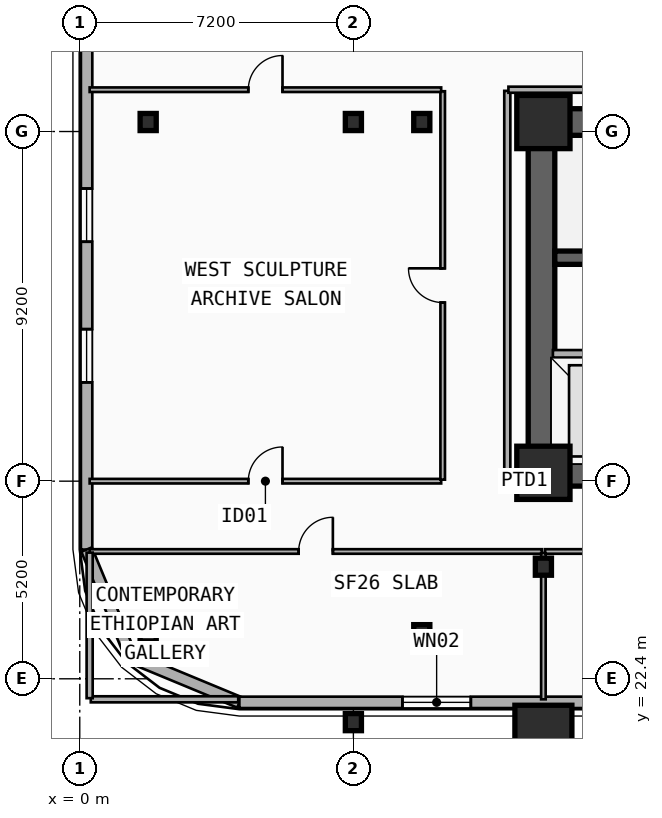
"""IFC4 building model, lengths in metres.
Left out: names, types, materials, properties, quantities, classifications, styles, units other than length and angle.
Written with IfcOpenShell. Run it as: python <this file> out.ifc"""

import sys

from ifc_helpers import new_model, si_unit, direction, frame, frame_2d, origin, origin_2d, place, context, subcontext, project, spatial, rectangle, i_section, extrude, element, fill, save


model = new_model("IFC4")
c1 = context("Model", 3, precision=1e-05, world=origin(), true_north=direction((0.0, 1.0)))
c2 = subcontext(c1, "Body", "Model", "MODEL_VIEW")
j1 = project(units=[si_unit("LENGTHUNIT", "METRE"), si_unit("PLANEANGLEUNIT", "RADIAN")], contexts=[c1])
p1 = place(None, origin())
s1 = spatial("IfcSite", under=j1, at=p1, CompositionType="ELEMENT")
p2 = place(p1, origin())
s2 = spatial("IfcBuilding", under=s1, at=p2, CompositionType="ELEMENT")
p3 = place(p2, frame((0.0, 0.0, 57.0)))
s3 = spatial("IfcBuildingStorey", under=s2, at=p3, CompositionType="ELEMENT", Elevation=57.0)
p4 = place(p3, frame((12.15, 37.05, 0.0), z_axis=(0.0, 0.0, 1.0), x_axis=(1.0, 0.0, 0.0)))
e1 = element("IfcWall", 1, at=p4, inside=s3, PredefinedType="SHEAR", context=c2, shape_type="SweptSolid", body=[
    extrude(rectangle(XDim=33.23, YDim=0.7, at=frame_2d((16.615, 0.0))), origin(), (0.0, 0.0, 1.0), 3.5),
])
p5 = place(p3, frame((21.18, 27.82, 0.0), z_axis=(0.0, 0.0, 1.0), x_axis=(-1.0, 0.0, 0.0)))
e2 = element("IfcWall", 2, at=p5, inside=s3, PredefinedType="SHEAR", context=c2, shape_type="SweptSolid", body=[
    extrude(rectangle(XDim=9.03, YDim=0.7, at=frame_2d((4.515, 0.0))), origin(), (0.0, 0.0, 1.0), 3.5),
])
p6 = place(p5, frame((2.68, 0.0, 0.0)))
e3 = element("IfcOpeningElement", 3, at=p6, cuts=e2, PredefinedType="OPENING", context=c2, shape_type="SweptSolid", body=[
    extrude(rectangle(XDim=1.1, YDim=2.15, at=frame_2d((0.55, 1.075))), frame((0.0, 0.36, 0.0), z_axis=(0.0, -1.0, 0.0), x_axis=(1.0, 0.0, 0.0)), (0.0, 0.0, 1.0), 0.72),
])
p7 = place(p3, frame((12.15, 28.17, 0.0), z_axis=(0.0, 0.0, 1.0), x_axis=(0.0, 1.0, 0.0)))
e4 = element("IfcWall", 4, at=p7, inside=s3, PredefinedType="SHEAR", context=c2, shape_type="SweptSolid", body=[
    extrude(rectangle(XDim=8.53, YDim=0.7, at=frame_2d((4.265, 0.0))), origin(), (0.0, 0.0, 1.0), 3.5),
])
p8 = place(p3, frame((21.005, 33.48, 0.0), z_axis=(0.0, 0.0, 1.0), x_axis=(-1.0, 0.0, 0.0)))
e5 = element("IfcWall", 5, at=p8, inside=s3, PredefinedType="SHEAR", context=c2, shape_type="SweptSolid", body=[
    extrude(rectangle(XDim=8.505, YDim=0.35, at=frame_2d((4.252, 0.0))), origin(), (0.0, 0.0, 1.0), 3.5),
])
p9 = place(p8, frame((0.22, 0.0, 0.0)))
e6 = element("IfcOpeningElement", 6, at=p9, cuts=e5, PredefinedType="OPENING", context=c2, shape_type="SweptSolid", body=[
    extrude(rectangle(XDim=1.1, YDim=2.15, at=frame_2d((0.55, 1.075))), frame((0.0, 0.185, 0.0), z_axis=(0.0, -1.0, 0.0), x_axis=(1.0, 0.0, 0.0)), (0.0, 0.0, 1.0), 0.37),
])
for number, where, z_axis, x_axis in (
    (7, (12.2, 27.82, 0.0), (0.0, 0.0, 1.0), (1.0, 0.0, 0.0)),
    (8, (12.2, 37.05, 0.0), (0.0, 0.0, 1.0), (1.0, 0.0, 0.0)),
):
    element("IfcColumn", number, at=place(p3, frame(where, z_axis=z_axis, x_axis=x_axis)), inside=s3, PredefinedType="COLUMN", context=c2, shape_type="SweptSolid", body=[
        extrude(rectangle(XDim=1.4, YDim=1.4, at=origin_2d()), origin(), (0.0, 0.0, 1.0), 3.5),
    ])
p10 = place(p3, frame((12.2, 25.35, 0.0), z_axis=(0.0, 0.0, 1.0), x_axis=(1.0, 0.0, 0.0)))
e9 = element("IfcColumn", 9, at=p10, inside=s3, PredefinedType="COLUMN", context=c2, shape_type="SweptSolid", body=[
    extrude(i_section(OverallWidth=0.424, OverallDepth=0.45, WebThickness=0.041, FlangeThickness=0.065, FilletRadius=0.015, at=origin_2d()), origin(), (0.0, 0.0, 1.0), 3.5),
])
p11 = place(p3, frame((12.2, 21.062, 0.0), z_axis=(0.0, -0.090172444535, 0.995926167066), x_axis=(1.0, 0.0, 0.0)))
e10 = element("IfcColumn", 10, at=p11, inside=s3, PredefinedType="COLUMN", context=c2, shape_type="SweptSolid", body=[
    extrude(rectangle(XDim=1.5, YDim=1.5, at=origin_2d()), origin(), (0.0, 0.0, 1.0), 3.514),
])
for number, where, z_axis, x_axis in (
    (11, (9.0, 23.6, 0.0), (0.0, 0.0, 1.0), (1.0, 0.0, 0.0)),
    (12, (9.0, 37.05, 0.0), (0.0, 0.0, 1.0), (1.0, 0.0, 0.0)),
    (13, (1.8, 23.6, 0.0), (0.0, 0.0, 1.0), (1.0, 0.0, 0.0)),
    (14, (1.8, 37.05, 0.0), (0.0, 0.0, 1.0), (1.0, 0.0, 0.0)),
):
    element("IfcColumn", number, at=place(p3, frame(where, z_axis=z_axis, x_axis=x_axis)), inside=s3, PredefinedType="COLUMN", context=c2, shape_type="SweptSolid", body=[
        extrude(i_section(OverallWidth=0.424, OverallDepth=0.45, WebThickness=0.041, FlangeThickness=0.065, FilletRadius=0.015, at=origin_2d()), origin(), (0.0, 0.0, 1.0), 3.5),
    ])
p12 = place(p3, frame((7.2, 21.356, 0.0), z_axis=(0.0, -0.079891690793, 0.996803550226), x_axis=(1.0, 0.0, 0.0)))
e15 = element("IfcColumn", 15, at=p12, inside=s3, PredefinedType="COLUMN", context=c2, shape_type="SweptSolid", body=[
    extrude(i_section(OverallWidth=0.424, OverallDepth=0.45, WebThickness=0.041, FlangeThickness=0.065, FilletRadius=0.015, at=origin_2d()), origin(), (0.0, 0.0, 1.0), 3.511),
])
p13 = place(p3, frame((7.2, 37.05, 0.0), z_axis=(0.0, 0.0, 1.0), x_axis=(1.0, 0.0, 0.0)))
e16 = element("IfcColumn", 16, at=p13, inside=s3, PredefinedType="COLUMN", context=c2, shape_type="SweptSolid", body=[
    extrude(i_section(OverallWidth=0.424, OverallDepth=0.45, WebThickness=0.041, FlangeThickness=0.065, FilletRadius=0.015, at=origin_2d()), origin(), (0.0, 0.0, 1.0), 3.5),
])
p14 = place(p3, frame((0.18, 25.8, 0.0), z_axis=(0.0, 0.0, 1.0), x_axis=(0.0, 1.0, 0.0)))
e17 = element("IfcWall", 17, at=p14, inside=s3, PredefinedType="SOLIDWALL", context=c2, shape_type="SweptSolid", body=[
    extrude(rectangle(XDim=15.2, YDim=0.3, at=frame_2d((7.6, 0.0))), origin(), (0.0, 0.0, 1.0), 3.24),
])
p15 = place(p14, frame((4.4, 0.0, 0.48)))
e18 = element("IfcOpeningElement", 18, at=p15, cuts=e17, PredefinedType="OPENING", context=c2, shape_type="SweptSolid", body=[
    extrude(rectangle(XDim=1.4, YDim=1.8, at=frame_2d((0.7, 0.9))), frame((0.0, 0.16, 0.0), z_axis=(0.0, -1.0, 0.0), x_axis=(1.0, 0.0, 0.0)), (0.0, 0.0, 1.0), 0.32),
])
p16 = place(p14, frame((8.1, 0.0, 0.48)))
e19 = element("IfcOpeningElement", 19, at=p16, cuts=e17, PredefinedType="OPENING", context=c2, shape_type="SweptSolid", body=[
    extrude(rectangle(XDim=1.4, YDim=1.8, at=frame_2d((0.7, 0.9))), frame((0.0, 0.16, 0.0), z_axis=(0.0, -1.0, 0.0), x_axis=(1.0, 0.0, 0.0)), (0.0, 0.0, 1.0), 0.32),
])
for number, where, z_axis, x_axis in (
    (20, (1.357, 22.958, 0.0), (0.0, 0.0, 1.0), (-0.383, 0.924, 0.0)),
    (21, (4.2, 21.78, 0.0), (0.0, 0.0, 1.0), (-0.924, 0.383, 0.0)),
):
    element("IfcWall", number, at=place(p3, frame(where, z_axis=z_axis, x_axis=x_axis)), inside=s3, PredefinedType="SOLIDWALL", context=c2, shape_type="SweptSolid", body=[
        extrude(rectangle(XDim=3.077, YDim=0.3, at=frame_2d((1.538, 0.0))), origin(), (0.0, 0.0, 1.0), 3.24),
    ])
p17 = place(p3, frame((53.4, 21.78, 0.0), z_axis=(0.0, 0.0, 1.0), x_axis=(-1.0, 0.0, 0.0)))
e22 = element("IfcWall", 22, at=p17, inside=s3, PredefinedType="SOLIDWALL", context=c2, shape_type="SweptSolid", body=[
    extrude(rectangle(XDim=49.2, YDim=0.3, at=frame_2d((24.6, 0.0))), origin(), (0.0, 0.0, 1.0), 2.72),
])
p18 = place(p17, frame((43.109, 0.0, 0.74)))
e23 = element("IfcOpeningElement", 23, at=p18, cuts=e22, PredefinedType="OPENING", context=c2, shape_type="SweptSolid", body=[
    extrude(rectangle(XDim=1.8, YDim=1.8, at=frame_2d((0.9, 0.9))), frame((0.0, 0.16, 0.0), z_axis=(0.0, -1.0, 0.0), x_axis=(1.0, 0.0, 0.0)), (0.0, 0.0, 1.0), 0.32),
])
p19 = place(p17, frame((38.948, 0.0, 0.48)))
e24 = element("IfcOpeningElement", 24, at=p19, cuts=e22, PredefinedType="OPENING", context=c2, shape_type="SweptSolid", body=[
    extrude(rectangle(XDim=1.2, YDim=1.5, at=frame_2d((0.6, 0.75))), frame((0.0, 0.16, 0.0), z_axis=(0.0, -1.0, 0.0), x_axis=(1.0, 0.0, 0.0)), (0.0, 0.0, 1.0), 0.32),
])
p20 = place(p17, frame((14.798, 0.0, 0.48)))
e25 = element("IfcOpeningElement", 25, at=p20, cuts=e22, PredefinedType="OPENING", context=c2, shape_type="SweptSolid", body=[
    extrude(rectangle(XDim=1.2, YDim=1.5, at=frame_2d((0.6, 0.75))), frame((0.0, 0.16, 0.0), z_axis=(0.0, -1.0, 0.0), x_axis=(1.0, 0.0, 0.0)), (0.0, 0.0, 1.0), 0.32),
])
p21 = place(p17, frame((4.291, 0.0, 0.74)))
e26 = element("IfcOpeningElement", 26, at=p21, cuts=e22, PredefinedType="OPENING", context=c2, shape_type="SweptSolid", body=[
    extrude(rectangle(XDim=1.8, YDim=1.8, at=frame_2d((0.9, 0.9))), frame((0.0, 0.16, 0.0), z_axis=(0.0, -1.0, 0.0), x_axis=(1.0, 0.0, 0.0)), (0.0, 0.0, 1.0), 0.32),
])
p22 = place(p3, frame((12.45, 30.95, 0.0), z_axis=(0.0, 0.0, 1.0), x_axis=(1.0, 0.0, 0.0)))
e27 = element("IfcWall", 27, at=p22, inside=s3, PredefinedType="PARTITIONING", context=c2, shape_type="SweptSolid", body=[
    extrude(rectangle(XDim=2.75, YDim=0.2, at=frame_2d((1.375, 0.0))), origin(), (0.0, 0.0, 1.0), 2.212),
])
p23 = place(p3, frame((0.26, 27.6, 0.0), z_axis=(0.0, 0.0, 1.0), x_axis=(1.0, 0.0, 0.0)))
e28 = element("IfcWall", 28, at=p23, inside=s3, PredefinedType="PARTITIONING", context=c2, shape_type="SweptSolid", body=[
    extrude(rectangle(XDim=9.25, YDim=0.12, at=frame_2d((4.625, 0.0))), origin(), (0.0, 0.0, 1.0), 2.57),
])
p24 = place(p23, frame((4.175, 0.0, 0.0)))
e29 = element("IfcOpeningElement", 29, at=p24, cuts=e28, PredefinedType="OPENING", context=c2, shape_type="SweptSolid", body=[
    extrude(rectangle(XDim=0.9, YDim=2.1, at=frame_2d((0.45, 1.05))), frame((0.0, 0.07, 0.0), z_axis=(0.0, -1.0, 0.0), x_axis=(1.0, 0.0, 0.0)), (0.0, 0.0, 1.0), 0.14),
])
p25 = place(p3, frame((0.26, 25.75, 0.0), z_axis=(0.0, 0.0, 1.0), x_axis=(1.0, 0.0, 0.0)))
e30 = element("IfcWall", 30, at=p25, inside=s3, PredefinedType="PARTITIONING", context=c2, shape_type="SweptSolid", body=[
    extrude(rectangle(XDim=11.9, YDim=0.12, at=frame_2d((5.95, 0.0))), origin(), (0.0, 0.0, 1.0), 2.31),
])
p26 = place(p25, frame((5.5, 0.0, 0.0)))
e31 = element("IfcOpeningElement", 31, at=p26, cuts=e30, PredefinedType="OPENING", context=c2, shape_type="SweptSolid", body=[
    extrude(rectangle(XDim=0.9, YDim=2.1, at=frame_2d((0.45, 1.05))), frame((0.0, 0.07, 0.0), z_axis=(0.0, -1.0, 0.0), x_axis=(1.0, 0.0, 0.0)), (0.0, 0.0, 1.0), 0.14),
])
p27 = place(p3, frame((12.24, 25.75, 0.0), z_axis=(0.0, 0.0, 1.0), x_axis=(1.0, 0.0, 0.0)))
e32 = element("IfcWall", 32, at=p27, inside=s3, PredefinedType="PARTITIONING", context=c2, shape_type="SweptSolid", body=[
    extrude(rectangle(XDim=10.52, YDim=0.12, at=frame_2d((5.26, 0.0))), origin(), (0.0, 0.0, 1.0), 2.31),
])
p28 = place(p27, frame((4.81, 0.0, 0.0)))
e33 = element("IfcOpeningElement", 33, at=p28, cuts=e32, PredefinedType="OPENING", context=c2, shape_type="SweptSolid", body=[
    extrude(rectangle(XDim=0.9, YDim=2.1, at=frame_2d((0.45, 1.05))), frame((0.0, 0.07, 0.0), z_axis=(0.0, -1.0, 0.0), x_axis=(1.0, 0.0, 0.0)), (0.0, 0.0, 1.0), 0.14),
])
p29 = place(p3, frame((9.55, 27.64, 0.0), z_axis=(0.0, 0.0, 1.0), x_axis=(0.0, 1.0, 0.0)))
e34 = element("IfcWall", 34, at=p29, inside=s3, PredefinedType="PARTITIONING", context=c2, shape_type="SweptSolid", body=[
    extrude(rectangle(XDim=10.22, YDim=0.12, at=frame_2d((5.11, 0.0))), origin(), (0.0, 0.0, 1.0), 2.72),
])
p30 = place(p29, frame((4.66, 0.0, 0.0)))
e35 = element("IfcOpeningElement", 35, at=p30, cuts=e34, PredefinedType="OPENING", context=c2, shape_type="SweptSolid", body=[
    extrude(rectangle(XDim=0.9, YDim=2.1, at=frame_2d((0.45, 1.05))), frame((0.0, 0.07, 0.0), z_axis=(0.0, -1.0, 0.0), x_axis=(1.0, 0.0, 0.0)), (0.0, 0.0, 1.0), 0.14),
])
p31 = place(p3, frame((0.26, 37.9, 0.0), z_axis=(0.0, 0.0, 1.0), x_axis=(1.0, 0.0, 0.0)))
e36 = element("IfcWall", 36, at=p31, inside=s3, PredefinedType="PARTITIONING", context=c2, shape_type="SweptSolid", body=[
    extrude(rectangle(XDim=9.25, YDim=0.12, at=frame_2d((4.625, 0.0))), origin(), (0.0, 0.0, 1.0), 3.24),
])
p32 = place(p31, frame((4.175, 0.0, 0.0)))
e37 = element("IfcOpeningElement", 37, at=p32, cuts=e36, PredefinedType="OPENING", context=c2, shape_type="SweptSolid", body=[
    extrude(rectangle(XDim=0.9, YDim=2.1, at=frame_2d((0.45, 1.05))), frame((0.0, 0.07, 0.0), z_axis=(0.0, -1.0, 0.0), x_axis=(1.0, 0.0, 0.0)), (0.0, 0.0, 1.0), 0.14),
])
p33 = place(p3, frame((12.2, 21.86, 0.0), z_axis=(0.0, 0.0, 1.0), x_axis=(0.0, 1.0, 0.0)))
e38 = element("IfcWall", 38, at=p33, inside=s3, PredefinedType="PARTITIONING", context=c2, shape_type="SweptSolid", body=[
    extrude(rectangle(XDim=3.85, YDim=0.12, at=frame_2d((1.925, 0.0))), origin(), (0.0, 0.0, 1.0), 2.31),
])
p34 = place(p3, frame((11.28, 27.6, 0.0), z_axis=(0.0, 0.0, 1.0), x_axis=(1.0, 0.0, 0.0)))
e39 = element("IfcWall", 39, at=p34, inside=s3, PredefinedType="PARTITIONING", context=c2, shape_type="SweptSolid", body=[
    extrude(rectangle(XDim=0.84, YDim=0.16, at=frame_2d((0.42, 0.0))), origin(), (0.0, 0.0, 1.0), 2.28),
])
p35 = place(p3, frame((11.25, 27.63, 0.0), z_axis=(0.0, 0.0, 1.0), x_axis=(0.0, 1.0, 0.0)))
e40 = element("IfcWall", 40, at=p35, inside=s3, PredefinedType="PARTITIONING", context=c2, shape_type="SweptSolid", body=[
    extrude(rectangle(XDim=10.24, YDim=0.16, at=frame_2d((5.12, 0.0))), origin(), (0.0, 0.0, 1.0), 2.72),
])
p36 = place(p3, frame((11.28, 37.9, 0.0), z_axis=(0.0, 0.0, 1.0), x_axis=(1.0, 0.0, 0.0)))
e41 = element("IfcWall", 41, at=p36, inside=s3, PredefinedType="PARTITIONING", context=c2, shape_type="SweptSolid", body=[
    extrude(rectangle(XDim=35.04, YDim=0.16, at=frame_2d((17.52, 0.0))), origin(), (0.0, 0.0, 1.0), 3.24),
])
p37 = place(p3, frame((0.29, 21.86, 0.0), z_axis=(0.0, 0.0, 1.0), x_axis=(1.0, 0.0, 0.0)))
e42 = element("IfcWall", 42, at=p37, inside=s3, PredefinedType="PARTITIONING", context=c2, shape_type="SweptSolid", body=[
    extrude(rectangle(XDim=3.88, YDim=0.16, at=frame_2d((1.94, 0.0))), origin(), (0.0, 0.0, 1.0), 2.72),
])
p38 = place(p3, frame((0.26, 21.89, 0.0), z_axis=(0.0, 0.0, 1.0), x_axis=(0.0, 1.0, 0.0)))
e43 = element("IfcWall", 43, at=p38, inside=s3, PredefinedType="PARTITIONING", context=c2, shape_type="SweptSolid", body=[
    extrude(rectangle(XDim=3.83, YDim=0.16, at=frame_2d((1.915, 0.0))), origin(), (0.0, 0.0, 1.0), 3.24),
])
p39 = place(p15, origin())
e44 = element("IfcWindow", 44, at=p39, inside=s3, PartitioningType="SINGLE_PANEL", PredefinedType="WINDOW", context=c2, shape_type="SweptSolid", body=[
    extrude(rectangle(XDim=1.4, YDim=1.8, at=frame_2d((0.7, 0.9))), frame((0.0, 0.03, 0.0), z_axis=(0.0, -1.0, 0.0), x_axis=(1.0, 0.0, 0.0)), (0.0, 0.0, 1.0), 0.06),
])
fill(e18, e44)
p40 = place(p16, origin())
e45 = element("IfcWindow", 45, at=p40, inside=s3, PartitioningType="SINGLE_PANEL", PredefinedType="WINDOW", context=c2, shape_type="SweptSolid", body=[
    extrude(rectangle(XDim=1.4, YDim=1.8, at=frame_2d((0.7, 0.9))), frame((0.0, 0.03, 0.0), z_axis=(0.0, -1.0, 0.0), x_axis=(1.0, 0.0, 0.0)), (0.0, 0.0, 1.0), 0.06),
])
fill(e19, e45)
p41 = place(p18, origin())
e46 = element("IfcWindow", 46, at=p41, inside=s3, PartitioningType="SINGLE_PANEL", PredefinedType="WINDOW", context=c2, shape_type="SweptSolid", body=[
    extrude(rectangle(XDim=1.8, YDim=1.8, at=frame_2d((0.9, 0.9))), frame((0.0, 0.03, 0.0), z_axis=(0.0, -1.0, 0.0), x_axis=(1.0, 0.0, 0.0)), (0.0, 0.0, 1.0), 0.06),
])
fill(e23, e46)
p42 = place(p24, origin())
e47 = element("IfcDoor", 47, at=p42, inside=s3, OperationType="SINGLE_SWING_RIGHT", PredefinedType="DOOR", context=c2, shape_type="SweptSolid", body=[
    extrude(rectangle(XDim=0.9, YDim=2.1, at=frame_2d((0.45, 1.05))), frame((0.0, 0.025, 0.0), z_axis=(0.0, -1.0, 0.0), x_axis=(1.0, 0.0, 0.0)), (0.0, 0.0, 1.0), 0.05),
])
fill(e29, e47)
p43 = place(p26, origin())
e48 = element("IfcDoor", 48, at=p43, inside=s3, OperationType="SINGLE_SWING_RIGHT", PredefinedType="DOOR", context=c2, shape_type="SweptSolid", body=[
    extrude(rectangle(XDim=0.9, YDim=2.1, at=frame_2d((0.45, 1.05))), frame((0.0, 0.025, 0.0), z_axis=(0.0, -1.0, 0.0), x_axis=(1.0, 0.0, 0.0)), (0.0, 0.0, 1.0), 0.05),
])
fill(e31, e48)
p44 = place(p30, origin())
e49 = element("IfcDoor", 49, at=p44, inside=s3, OperationType="SINGLE_SWING_RIGHT", PredefinedType="DOOR", context=c2, shape_type="SweptSolid", body=[
    extrude(rectangle(XDim=0.9, YDim=2.1, at=frame_2d((0.45, 1.05))), frame((0.0, 0.025, 0.0), z_axis=(0.0, -1.0, 0.0), x_axis=(1.0, 0.0, 0.0)), (0.0, 0.0, 1.0), 0.05),
])
fill(e35, e49)
p45 = place(p32, origin())
e50 = element("IfcDoor", 50, at=p45, inside=s3, OperationType="SINGLE_SWING_RIGHT", PredefinedType="DOOR", context=c2, shape_type="SweptSolid", body=[
    extrude(rectangle(XDim=0.9, YDim=2.1, at=frame_2d((0.45, 1.05))), frame((0.0, 0.025, 0.0), z_axis=(0.0, -1.0, 0.0), x_axis=(1.0, 0.0, 0.0)), (0.0, 0.0, 1.0), 0.05),
])
fill(e37, e50)
save(model, sys.argv[1])
